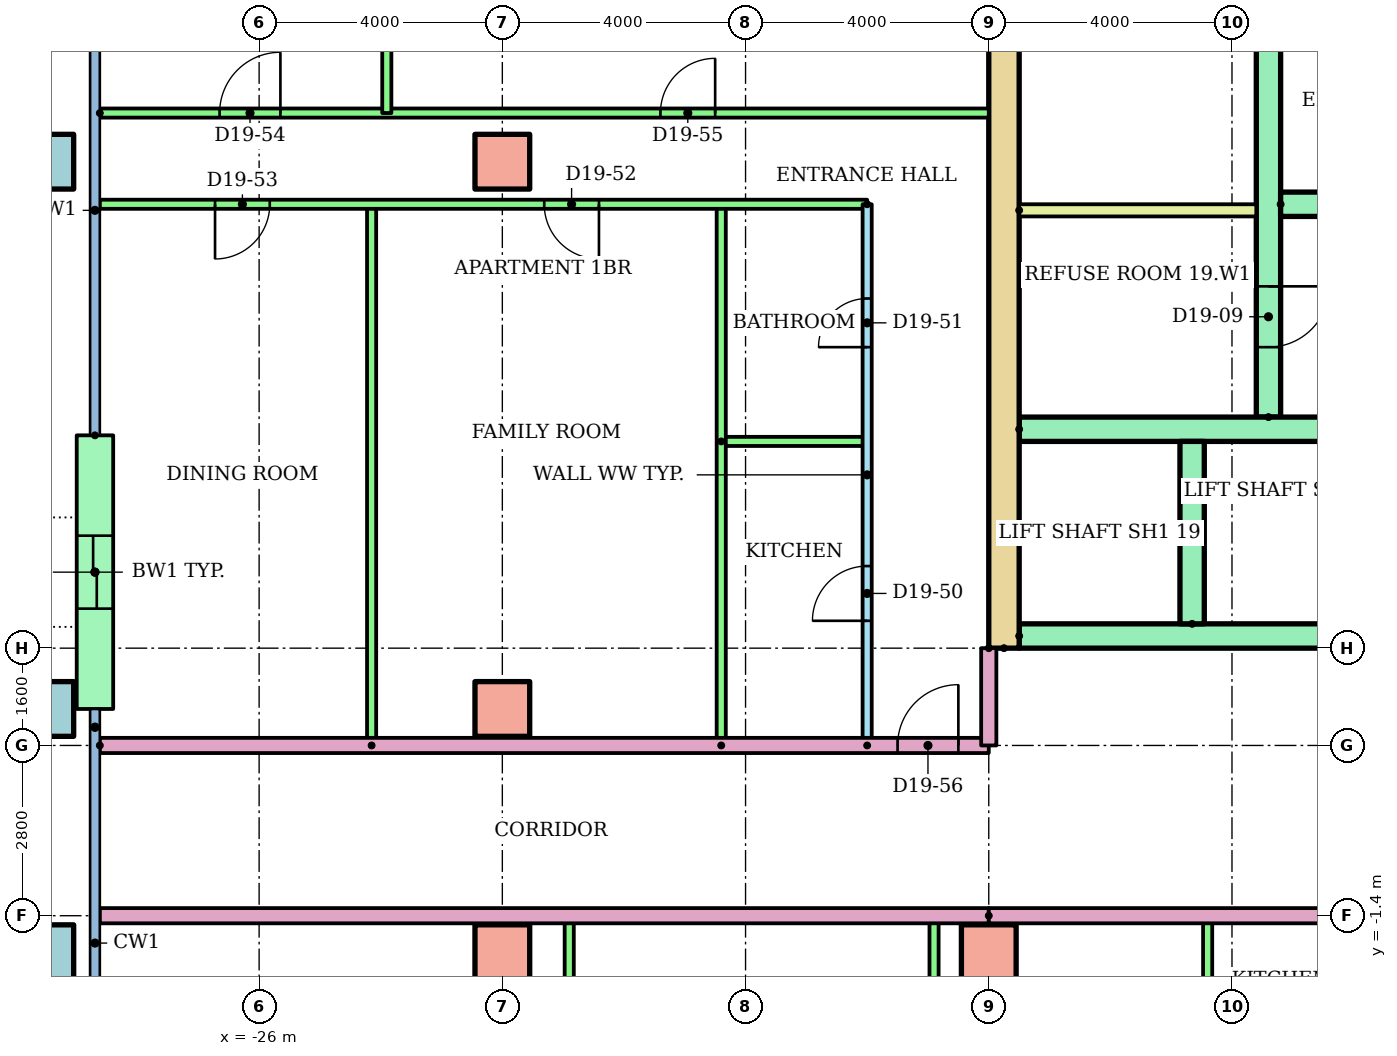
"""IFC4 building model, lengths in metres.
Left out: names, types, materials, properties, quantities, classifications, styles, units other than length and angle.
Written with IfcOpenShell. Run it as: python <this file> out.ifc"""

import sys

from ifc_helpers import new_model, si_unit, direction, frame, frame_2d, origin, origin_2d, place, context, subcontext, project, spatial, rectangle, hollow_rectangle, extrude, element, fill, save


model = new_model("IFC4")
c1 = context("Model", 3, precision=1e-05, world=origin(), true_north=direction((0.0, 1.0)))
c2 = subcontext(c1, "Body", "Model", "MODEL_VIEW")
j1 = project(units=[si_unit("LENGTHUNIT", "METRE"), si_unit("PLANEANGLEUNIT", "RADIAN")], contexts=[c1])
p1 = place(None, origin())
s1 = spatial("IfcSite", under=j1, at=p1, CompositionType="ELEMENT")
p2 = place(p1, origin())
s2 = spatial("IfcBuilding", under=s1, at=p2, CompositionType="ELEMENT")
p3 = place(p2, frame((0.0, 0.0, 77.5)))
s3 = spatial("IfcBuildingStorey", under=s2, at=p3, CompositionType="ELEMENT", Elevation=77.5)
p4 = place(p3, frame((-29.5, -2.0, 0.0)))
e1 = element("IfcColumn", 1, at=p4, inside=s3, PredefinedType="COLUMN", context=c2, shape_type="SweptSolid", body=[
    extrude(hollow_rectangle(XDim=0.9, YDim=0.9, WallThickness=0.045, at=origin_2d()), origin(), (0.0, 0.0, 1.0), 3.2),
])
for number, where in (
    (2, (-22.0, -2.0, 0.0)),
    (3, (-14.0, -2.0, 0.0)),
):
    element("IfcColumn", number, at=place(p3, frame(where)), inside=s3, PredefinedType="COLUMN", context=c2, shape_type="SweptSolid", body=[
        extrude(rectangle(XDim=0.9, YDim=0.9, at=origin_2d()), origin(), (0.0, 0.0, 1.0), 3.2),
    ])
p5 = place(p3, frame((-29.5, 2.0, 0.0)))
e4 = element("IfcColumn", 4, at=p5, inside=s3, PredefinedType="COLUMN", context=c2, shape_type="SweptSolid", body=[
    extrude(hollow_rectangle(XDim=0.9, YDim=0.9, WallThickness=0.045, at=origin_2d()), origin(), (0.0, 0.0, 1.0), 3.2),
])
p6 = place(p3, frame((-22.0, 2.0, 0.0)))
e5 = element("IfcColumn", 5, at=p6, inside=s3, PredefinedType="COLUMN", context=c2, shape_type="SweptSolid", body=[
    extrude(rectangle(XDim=0.9, YDim=0.9, at=origin_2d()), origin(), (0.0, 0.0, 1.0), 3.2),
])
p7 = place(p3, frame((-29.5, 11.0, 0.0)))
e6 = element("IfcColumn", 6, at=p7, inside=s3, PredefinedType="COLUMN", context=c2, shape_type="SweptSolid", body=[
    extrude(hollow_rectangle(XDim=0.9, YDim=0.9, WallThickness=0.045, at=origin_2d()), origin(), (0.0, 0.0, 1.0), 3.2),
])
p8 = place(p3, frame((-22.0, 11.0, 0.0)))
e7 = element("IfcColumn", 7, at=p8, inside=s3, PredefinedType="COLUMN", context=c2, shape_type="SweptSolid", body=[
    extrude(rectangle(XDim=0.9, YDim=0.9, at=origin_2d()), origin(), (0.0, 0.0, 1.0), 3.2),
])
p9 = place(p3, frame((-28.7, 6.5, 0.0), z_axis=(0.0, 0.0, 1.0), x_axis=(0.0, -1.0, 0.0)))
e8 = element("IfcWall", 8, at=p9, inside=s3, PredefinedType="STANDARD", context=c2, shape_type="SweptSolid", body=[
    extrude(rectangle(XDim=4.5, YDim=0.6, at=frame_2d((2.25, 0.0))), origin(), (0.0, 0.0, 1.0), 2.92),
])
p10 = place(p9, frame((1.65, 0.0, 0.0)))
e9 = element("IfcOpeningElement", 9, at=p10, cuts=e8, PredefinedType="OPENING", context=c2, shape_type="SweptSolid", body=[
    extrude(rectangle(XDim=1.2, YDim=2.1, at=frame_2d((0.6, 1.05))), frame((0.0, 0.31, 0.0), z_axis=(0.0, -1.0, 0.0), x_axis=(1.0, 0.0, 0.0)), (0.0, 0.0, 1.0), 0.62),
])
p11 = place(p3, frame((-13.75, 3.0, 0.0), z_axis=(0.0, 0.0, 1.0), x_axis=(0.0, 1.0, 0.0)))
e10 = element("IfcWall", 10, at=p11, inside=s3, PredefinedType="SHEAR", context=c2, shape_type="SweptSolid", body=[
    extrude(rectangle(XDim=17.0, YDim=0.5, at=frame_2d((8.5, 0.0))), origin(), (0.0, 0.0, 1.0), 2.92),
])
p12 = place(p3, frame((-9.4, 6.8, 0.0), z_axis=(0.0, 0.0, 1.0), x_axis=(0.0, 1.0, 0.0)))
e11 = element("IfcWall", 11, at=p12, inside=s3, PredefinedType="SHEAR", context=c2, shape_type="SweptSolid", body=[
    extrude(rectangle(XDim=12.7, YDim=0.4, at=frame_2d((6.35, 0.0))), origin(), (0.0, 0.0, 1.0), 2.92),
])
p13 = place(p12, frame((1.15, 0.0, 0.0)))
e12 = element("IfcOpeningElement", 12, at=p13, cuts=e11, PredefinedType="OPENING", context=c2, shape_type="SweptSolid", body=[
    extrude(rectangle(XDim=1.0, YDim=2.1, at=frame_2d((0.5, 1.05))), frame((0.0, 0.21, 0.0), z_axis=(0.0, -1.0, 0.0), x_axis=(1.0, 0.0, 0.0)), (0.0, 0.0, 1.0), 0.42),
])
p14 = place(p12, frame((7.925, 0.0, 0.0)))
e13 = element("IfcOpeningElement", 13, at=p14, cuts=e11, PredefinedType="OPENING", context=c2, shape_type="SweptSolid", body=[
    extrude(rectangle(XDim=1.0, YDim=2.1, at=frame_2d((0.5, 1.05))), frame((0.0, 0.21, 0.0), z_axis=(0.0, -1.0, 0.0), x_axis=(1.0, 0.0, 0.0)), (0.0, 0.0, 1.0), 0.42),
])
p15 = place(p3, frame((-13.5, 3.2, 0.0)))
e14 = element("IfcWall", 14, at=p15, inside=s3, PredefinedType="SHEAR", context=c2, shape_type="SweptSolid", body=[
    extrude(rectangle(XDim=27.0, YDim=0.4, at=frame_2d((13.5, 0.0))), origin(), (0.0, 0.0, 1.0), 2.92),
])
p16 = place(p15, frame((6.861, 0.0, 0.0)))
e15 = element("IfcOpeningElement", 15, at=p16, cuts=e14, PredefinedType="OPENING", context=c2, shape_type="SweptSolid", body=[
    extrude(rectangle(XDim=1.1, YDim=2.1, at=frame_2d((0.55, 1.05))), frame((0.0, 0.21, 0.0), z_axis=(0.0, -1.0, 0.0), x_axis=(1.0, 0.0, 0.0)), (0.0, 0.0, 1.0), 0.42),
])
p17 = place(p15, frame((9.906, 0.0, 0.0)))
e16 = element("IfcOpeningElement", 16, at=p17, cuts=e14, PredefinedType="OPENING", context=c2, shape_type="SweptSolid", body=[
    extrude(rectangle(XDim=1.1, YDim=2.1, at=frame_2d((0.55, 1.05))), frame((0.0, 0.21, 0.0), z_axis=(0.0, -1.0, 0.0), x_axis=(1.0, 0.0, 0.0)), (0.0, 0.0, 1.0), 0.42),
])
p18 = place(p15, frame((15.994, 0.0, 0.0)))
e17 = element("IfcOpeningElement", 17, at=p18, cuts=e14, PredefinedType="OPENING", context=c2, shape_type="SweptSolid", body=[
    extrude(rectangle(XDim=1.1, YDim=2.1, at=frame_2d((0.55, 1.05))), frame((0.0, 0.21, 0.0), z_axis=(0.0, -1.0, 0.0), x_axis=(1.0, 0.0, 0.0)), (0.0, 0.0, 1.0), 0.42),
])
p19 = place(p15, frame((19.039, 0.0, 0.0)))
e18 = element("IfcOpeningElement", 18, at=p19, cuts=e14, PredefinedType="OPENING", context=c2, shape_type="SweptSolid", body=[
    extrude(rectangle(XDim=1.1, YDim=2.1, at=frame_2d((0.55, 1.05))), frame((0.0, 0.21, 0.0), z_axis=(0.0, -1.0, 0.0), x_axis=(1.0, 0.0, 0.0)), (0.0, 0.0, 1.0), 0.42),
])
p20 = place(p15, frame((12.6, 0.0, 0.0)))
e19 = element("IfcOpeningElement", 19, at=p20, cuts=e14, PredefinedType="OPENING", context=c2, shape_type="SweptSolid", body=[
    extrude(rectangle(XDim=1.8, YDim=2.1, at=frame_2d((0.9, 1.05))), frame((0.0, 0.21, 0.0), z_axis=(0.0, -1.0, 0.0), x_axis=(1.0, 0.0, 0.0)), (0.0, 0.0, 1.0), 0.42),
])
p21 = place(p3, frame((-13.5, 6.6, 0.0)))
e20 = element("IfcWall", 20, at=p21, inside=s3, PredefinedType="SHEAR", context=c2, shape_type="SweptSolid", body=[
    extrude(rectangle(XDim=11.978, YDim=0.4, at=frame_2d((5.989, 0.0))), origin(), (0.0, 0.0, 1.0), 2.92),
])
p22 = place(p3, frame((-10.656, 3.4, 0.0), z_axis=(0.0, 0.0, 1.0), x_axis=(0.0, 1.0, 0.0)))
e21 = element("IfcWall", 21, at=p22, inside=s3, PredefinedType="SHEAR", context=c2, shape_type="SweptSolid", body=[
    extrude(rectangle(XDim=3.0, YDim=0.4, at=frame_2d((1.5, 0.0))), origin(), (0.0, 0.0, 1.0), 2.92),
])
p23 = place(p3, frame((-9.2, 10.3, 0.0)))
e22 = element("IfcWall", 22, at=p23, inside=s3, PredefinedType="SHEAR", context=c2, shape_type="SweptSolid", body=[
    extrude(rectangle(XDim=8.0, YDim=0.4, at=frame_2d((4.0, 0.0))), origin(), (0.0, 0.0, 1.0), 2.92),
])
p24 = place(p23, frame((2.033, 0.0, 0.0)))
e23 = element("IfcOpeningElement", 23, at=p24, cuts=e22, PredefinedType="OPENING", context=c2, shape_type="SweptSolid", body=[
    extrude(rectangle(XDim=1.0, YDim=2.1, at=frame_2d((0.5, 1.05))), frame((0.0, 0.21, 0.0), z_axis=(0.0, -1.0, 0.0), x_axis=(1.0, 0.0, 0.0)), (0.0, 0.0, 1.0), 0.42),
])
p25 = place(p23, frame((6.133, 0.0, 0.0)))
e24 = element("IfcOpeningElement", 24, at=p25, cuts=e22, PredefinedType="OPENING", context=c2, shape_type="SweptSolid", body=[
    extrude(rectangle(XDim=1.0, YDim=2.1, at=frame_2d((0.5, 1.05))), frame((0.0, 0.21, 0.0), z_axis=(0.0, -1.0, 0.0), x_axis=(1.0, 0.0, 0.0)), (0.0, 0.0, 1.0), 0.42),
])
p26 = place(p3, frame((-13.5, 10.2, 0.0)))
e25 = element("IfcWall", 25, at=p26, inside=s3, PredefinedType="PARTITIONING", context=c2, shape_type="SweptSolid", body=[
    extrude(rectangle(XDim=3.9, YDim=0.2, at=frame_2d((1.95, 0.0))), origin(), (0.0, 0.0, 1.0), 2.92),
])
for number, where, z_axis, x_axis in (
    (26, (-10.4, -7.9, 0.0), (0.0, 0.0, 1.0), (0.0, 1.0, 0.0)),
    (27, (-14.9, -7.9, 0.0), (0.0, 0.0, 1.0), (0.0, 1.0, 0.0)),
    (28, (-20.9, -7.9, 0.0), (0.0, 0.0, 1.0), (0.0, 1.0, 0.0)),
):
    element("IfcWall", number, at=place(p3, frame(where, z_axis=z_axis, x_axis=x_axis)), inside=s3, PredefinedType="PARTITIONING", context=c2, shape_type="SweptSolid", body=[
        extrude(rectangle(XDim=6.5, YDim=0.15, at=frame_2d((3.25, 0.0))), origin(), (0.0, 0.0, 1.0), 2.4),
    ])
p27 = place(p3, frame((-14.0, -1.4, 0.0), z_axis=(0.0, 0.0, 1.0), x_axis=(-1.0, 0.0, 0.0)))
e29 = element("IfcWall", 29, at=p27, inside=s3, PredefinedType="PARTITIONING", context=c2, shape_type="SweptSolid", body=[
    extrude(rectangle(XDim=14.62, YDim=0.25, at=frame_2d((7.31, 0.0))), origin(), (0.0, 0.0, 1.0), 2.4),
])
p28 = place(p3, frame((-16.0, 1.4, 0.0), z_axis=(0.0, 0.0, 1.0), x_axis=(0.0, 1.0, 0.0)))
e30 = element("IfcWall", 30, at=p28, inside=s3, PredefinedType="PARTITIONING", context=c2, shape_type="SweptSolid", body=[
    extrude(rectangle(XDim=8.9, YDim=0.15, at=frame_2d((4.45, 0.0))), origin(), (0.0, 0.0, 1.0), 2.4),
])
p29 = place(p28, frame((2.05, 0.0, 0.0)))
e31 = element("IfcOpeningElement", 31, at=p29, cuts=e30, PredefinedType="OPENING", context=c2, shape_type="SweptSolid", body=[
    extrude(rectangle(XDim=0.9, YDim=2.1, at=frame_2d((0.45, 1.05))), frame((0.0, 0.085, 0.0), z_axis=(0.0, -1.0, 0.0), x_axis=(1.0, 0.0, 0.0)), (0.0, 0.0, 1.0), 0.17),
])
p30 = place(p28, frame((6.55, 0.0, 0.0)))
e32 = element("IfcOpeningElement", 32, at=p30, cuts=e30, PredefinedType="OPENING", context=c2, shape_type="SweptSolid", body=[
    extrude(rectangle(XDim=0.8, YDim=2.1, at=frame_2d((0.4, 1.05))), frame((0.0, 0.085, 0.0), z_axis=(0.0, -1.0, 0.0), x_axis=(1.0, 0.0, 0.0)), (0.0, 0.0, 1.0), 0.17),
])
p31 = place(p3, frame((-18.4, 6.4, 0.0)))
e33 = element("IfcWall", 33, at=p31, inside=s3, PredefinedType="PARTITIONING", context=c2, shape_type="SweptSolid", body=[
    extrude(rectangle(XDim=2.4, YDim=0.15, at=frame_2d((1.2, 0.0))), origin(), (0.0, 0.0, 1.0), 2.4),
])
for number, where, z_axis, x_axis in (
    (34, (-18.4, 1.4, 0.0), (0.0, 0.0, 1.0), (0.0, 1.0, 0.0)),
    (35, (-24.15, 1.4, 0.0), (0.0, 0.0, 1.0), (0.0, 1.0, 0.0)),
):
    element("IfcWall", number, at=place(p3, frame(where, z_axis=z_axis, x_axis=x_axis)), inside=s3, PredefinedType="PARTITIONING", context=c2, shape_type="SweptSolid", body=[
        extrude(rectangle(XDim=8.9, YDim=0.15, at=frame_2d((4.45, 0.0))), origin(), (0.0, 0.0, 1.0), 2.4),
    ])
p32 = place(p3, frame((-16.0, 10.3, 0.0), z_axis=(0.0, 0.0, 1.0), x_axis=(-1.0, 0.0, 0.0)))
e36 = element("IfcWall", 36, at=p32, inside=s3, PredefinedType="PARTITIONING", context=c2, shape_type="SweptSolid", body=[
    extrude(rectangle(XDim=12.62, YDim=0.15, at=frame_2d((6.31, 0.0))), origin(), (0.0, 0.0, 1.0), 2.4),
])
p33 = place(p32, frame((4.411, 0.0, 0.0)))
e37 = element("IfcOpeningElement", 37, at=p33, cuts=e36, PredefinedType="OPENING", context=c2, shape_type="SweptSolid", body=[
    extrude(rectangle(XDim=0.9, YDim=2.1, at=frame_2d((0.45, 1.05))), frame((0.0, 0.085, 0.0), z_axis=(0.0, -1.0, 0.0), x_axis=(1.0, 0.0, 0.0)), (0.0, 0.0, 1.0), 0.17),
])
p34 = place(p32, frame((9.825, 0.0, 0.0)))
e38 = element("IfcOpeningElement", 38, at=p34, cuts=e36, PredefinedType="OPENING", context=c2, shape_type="SweptSolid", body=[
    extrude(rectangle(XDim=0.9, YDim=2.1, at=frame_2d((0.45, 1.05))), frame((0.0, 0.085, 0.0), z_axis=(0.0, -1.0, 0.0), x_axis=(1.0, 0.0, 0.0)), (0.0, 0.0, 1.0), 0.17),
])
p35 = place(p3, frame((-28.62, 11.8, 0.0)))
e39 = element("IfcWall", 39, at=p35, inside=s3, PredefinedType="PARTITIONING", context=c2, shape_type="SweptSolid", body=[
    extrude(rectangle(XDim=14.62, YDim=0.15, at=frame_2d((7.31, 0.0))), origin(), (0.0, 0.0, 1.0), 2.4),
])
p36 = place(p35, frame((1.97, 0.0, 0.0)))
e40 = element("IfcOpeningElement", 40, at=p36, cuts=e39, PredefinedType="OPENING", context=c2, shape_type="SweptSolid", body=[
    extrude(rectangle(XDim=1.0, YDim=2.1, at=frame_2d((0.5, 1.05))), frame((0.0, 0.085, 0.0), z_axis=(0.0, -1.0, 0.0), x_axis=(1.0, 0.0, 0.0)), (0.0, 0.0, 1.0), 0.17),
])
p37 = place(p35, frame((9.22, 0.0, 0.0)))
e41 = element("IfcOpeningElement", 41, at=p37, cuts=e39, PredefinedType="OPENING", context=c2, shape_type="SweptSolid", body=[
    extrude(rectangle(XDim=0.9, YDim=2.1, at=frame_2d((0.45, 1.05))), frame((0.0, 0.085, 0.0), z_axis=(0.0, -1.0, 0.0), x_axis=(1.0, 0.0, 0.0)), (0.0, 0.0, 1.0), 0.17),
])
p38 = place(p3, frame((-23.9, 16.82, 0.0), z_axis=(0.0, 0.0, 1.0), x_axis=(0.0, -1.0, 0.0)))
e42 = element("IfcWall", 42, at=p38, inside=s3, PredefinedType="PARTITIONING", context=c2, shape_type="SweptSolid", body=[
    extrude(rectangle(XDim=5.02, YDim=0.15, at=frame_2d((2.51, 0.0))), origin(), (0.0, 0.0, 1.0), 2.4),
])
p39 = place(p3, frame((-28.62, 1.4, 0.0)))
e43 = element("IfcWall", 43, at=p39, inside=s3, PredefinedType="PARTITIONING", context=c2, shape_type="SweptSolid", body=[
    extrude(rectangle(XDim=14.62, YDim=0.25, at=frame_2d((7.31, 0.0))), origin(), (0.0, 0.0, 1.0), 2.4),
])
p40 = place(p39, frame((13.12, 0.0, 0.0)))
e44 = element("IfcOpeningElement", 44, at=p40, cuts=e43, PredefinedType="OPENING", context=c2, shape_type="SweptSolid", body=[
    extrude(rectangle(XDim=1.0, YDim=2.1, at=frame_2d((0.5, 1.05))), frame((0.0, 0.135, 0.0), z_axis=(0.0, -1.0, 0.0), x_axis=(1.0, 0.0, 0.0)), (0.0, 0.0, 1.0), 0.27),
])
p41 = place(p3, frame((14.0, -1.4, 0.0), z_axis=(0.0, 0.0, 1.0), x_axis=(-1.0, 0.0, 0.0)))
e45 = element("IfcWall", 45, at=p41, inside=s3, PredefinedType="PARTITIONING", context=c2, shape_type="SweptSolid", body=[
    extrude(rectangle(XDim=28.0, YDim=0.25, at=frame_2d((14.0, 0.0))), origin(), (0.0, 0.0, 1.0), 2.4),
])
p42 = place(p41, frame((20.689, 0.0, 0.0)))
e46 = element("IfcOpeningElement", 46, at=p42, cuts=e45, PredefinedType="OPENING", context=c2, shape_type="SweptSolid", body=[
    extrude(rectangle(XDim=1.0, YDim=2.1, at=frame_2d((0.5, 1.05))), frame((0.0, 0.135, 0.0), z_axis=(0.0, -1.0, 0.0), x_axis=(1.0, 0.0, 0.0)), (0.0, 0.0, 1.0), 0.27),
])
p43 = place(p41, frame((18.311, 0.0, 0.0)))
e47 = element("IfcOpeningElement", 47, at=p43, cuts=e45, PredefinedType="OPENING", context=c2, shape_type="SweptSolid", body=[
    extrude(rectangle(XDim=1.0, YDim=2.1, at=frame_2d((0.5, 1.05))), frame((0.0, 0.135, 0.0), z_axis=(0.0, -1.0, 0.0), x_axis=(1.0, 0.0, 0.0)), (0.0, 0.0, 1.0), 0.27),
])
p44 = place(p41, frame((2.311, 0.0, 0.0)))
e48 = element("IfcOpeningElement", 48, at=p44, cuts=e45, PredefinedType="OPENING", context=c2, shape_type="SweptSolid", body=[
    extrude(rectangle(XDim=1.0, YDim=2.1, at=frame_2d((0.5, 1.05))), frame((0.0, 0.135, 0.0), z_axis=(0.0, -1.0, 0.0), x_axis=(1.0, 0.0, 0.0)), (0.0, 0.0, 1.0), 0.27),
])
p45 = place(p3, frame((-14.0, 3.0, 0.0), z_axis=(0.0, 0.0, 1.0), x_axis=(0.0, -1.0, 0.0)))
e49 = element("IfcWall", 49, at=p45, inside=s3, PredefinedType="PARTITIONING", context=c2, shape_type="SweptSolid", body=[
    extrude(rectangle(XDim=1.6, YDim=0.25, at=frame_2d((0.8, 0.0))), origin(), (0.0, 0.0, 1.0), 2.4),
])
p46 = place(p13, frame((1.0, 0.0, 0.0), z_axis=(0.0, 0.0, 1.0), x_axis=(-1.0, 0.0, 0.0)))
e50 = element("IfcDoor", 50, at=p46, inside=s3, OperationType="SINGLE_SWING_RIGHT", PredefinedType="DOOR", context=c2, shape_type="SweptSolid", body=[
    extrude(rectangle(XDim=1.0, YDim=2.1, at=frame_2d((0.5, 1.05))), frame((0.0, 0.025, 0.0), z_axis=(0.0, -1.0, 0.0), x_axis=(1.0, 0.0, 0.0)), (0.0, 0.0, 1.0), 0.05),
])
fill(e12, e50)
p47 = place(p29, origin())
e51 = element("IfcDoor", 51, at=p47, inside=s3, OperationType="SINGLE_SWING_LEFT", PredefinedType="DOOR", context=c2, shape_type="SweptSolid", body=[
    extrude(rectangle(XDim=0.9, YDim=2.1, at=frame_2d((0.45, 1.05))), frame((0.0, 0.025, 0.0), z_axis=(0.0, -1.0, 0.0), x_axis=(1.0, 0.0, 0.0)), (0.0, 0.0, 1.0), 0.05),
])
fill(e31, e51)
p48 = place(p30, origin())
e52 = element("IfcDoor", 52, at=p48, inside=s3, OperationType="SINGLE_SWING_LEFT", PredefinedType="DOOR", context=c2, shape_type="SweptSolid", body=[
    extrude(rectangle(XDim=0.8, YDim=2.1, at=frame_2d((0.4, 1.05))), frame((0.0, 0.025, 0.0), z_axis=(0.0, -1.0, 0.0), x_axis=(1.0, 0.0, 0.0)), (0.0, 0.0, 1.0), 0.05),
])
fill(e32, e52)
p49 = place(p33, origin())
e53 = element("IfcDoor", 53, at=p49, inside=s3, OperationType="SINGLE_SWING_LEFT", PredefinedType="DOOR", context=c2, shape_type="SweptSolid", body=[
    extrude(rectangle(XDim=0.9, YDim=2.1, at=frame_2d((0.45, 1.05))), frame((0.0, 0.025, 0.0), z_axis=(0.0, -1.0, 0.0), x_axis=(1.0, 0.0, 0.0)), (0.0, 0.0, 1.0), 0.05),
])
fill(e37, e53)
p50 = place(p34, origin())
e54 = element("IfcDoor", 54, at=p50, inside=s3, OperationType="SINGLE_SWING_RIGHT", PredefinedType="DOOR", context=c2, shape_type="SweptSolid", body=[
    extrude(rectangle(XDim=0.9, YDim=2.1, at=frame_2d((0.45, 1.05))), frame((0.0, 0.025, 0.0), z_axis=(0.0, -1.0, 0.0), x_axis=(1.0, 0.0, 0.0)), (0.0, 0.0, 1.0), 0.05),
])
fill(e38, e54)
p51 = place(p36, origin())
e55 = element("IfcDoor", 55, at=p51, inside=s3, OperationType="SINGLE_SWING_RIGHT", PredefinedType="DOOR", context=c2, shape_type="SweptSolid", body=[
    extrude(rectangle(XDim=1.0, YDim=2.1, at=frame_2d((0.5, 1.05))), frame((0.0, 0.025, 0.0), z_axis=(0.0, -1.0, 0.0), x_axis=(1.0, 0.0, 0.0)), (0.0, 0.0, 1.0), 0.05),
])
fill(e40, e55)
p52 = place(p37, origin())
e56 = element("IfcDoor", 56, at=p52, inside=s3, OperationType="SINGLE_SWING_RIGHT", PredefinedType="DOOR", context=c2, shape_type="SweptSolid", body=[
    extrude(rectangle(XDim=0.9, YDim=2.1, at=frame_2d((0.45, 1.05))), frame((0.0, 0.025, 0.0), z_axis=(0.0, -1.0, 0.0), x_axis=(1.0, 0.0, 0.0)), (0.0, 0.0, 1.0), 0.05),
])
fill(e41, e56)
p53 = place(p40, origin())
e57 = element("IfcDoor", 57, at=p53, inside=s3, OperationType="SINGLE_SWING_RIGHT", PredefinedType="DOOR", context=c2, shape_type="SweptSolid", body=[
    extrude(rectangle(XDim=1.0, YDim=2.1, at=frame_2d((0.5, 1.05))), frame((0.0, 0.025, 0.0), z_axis=(0.0, -1.0, 0.0), x_axis=(1.0, 0.0, 0.0)), (0.0, 0.0, 1.0), 0.05),
])
fill(e44, e57)
p54 = place(p10, origin())
e58 = element("IfcDoor", 58, at=p54, inside=s3, OperationType="SLIDING_TO_LEFT", PredefinedType="DOOR", context=c2, shape_type="SweptSolid", body=[
    extrude(rectangle(XDim=1.2, YDim=2.1, at=frame_2d((0.6, 1.05))), frame((0.0, 0.025, 0.0), z_axis=(0.0, -1.0, 0.0), x_axis=(1.0, 0.0, 0.0)), (0.0, 0.0, 1.0), 0.05),
])
fill(e9, e58)
save(model, sys.argv[1])
